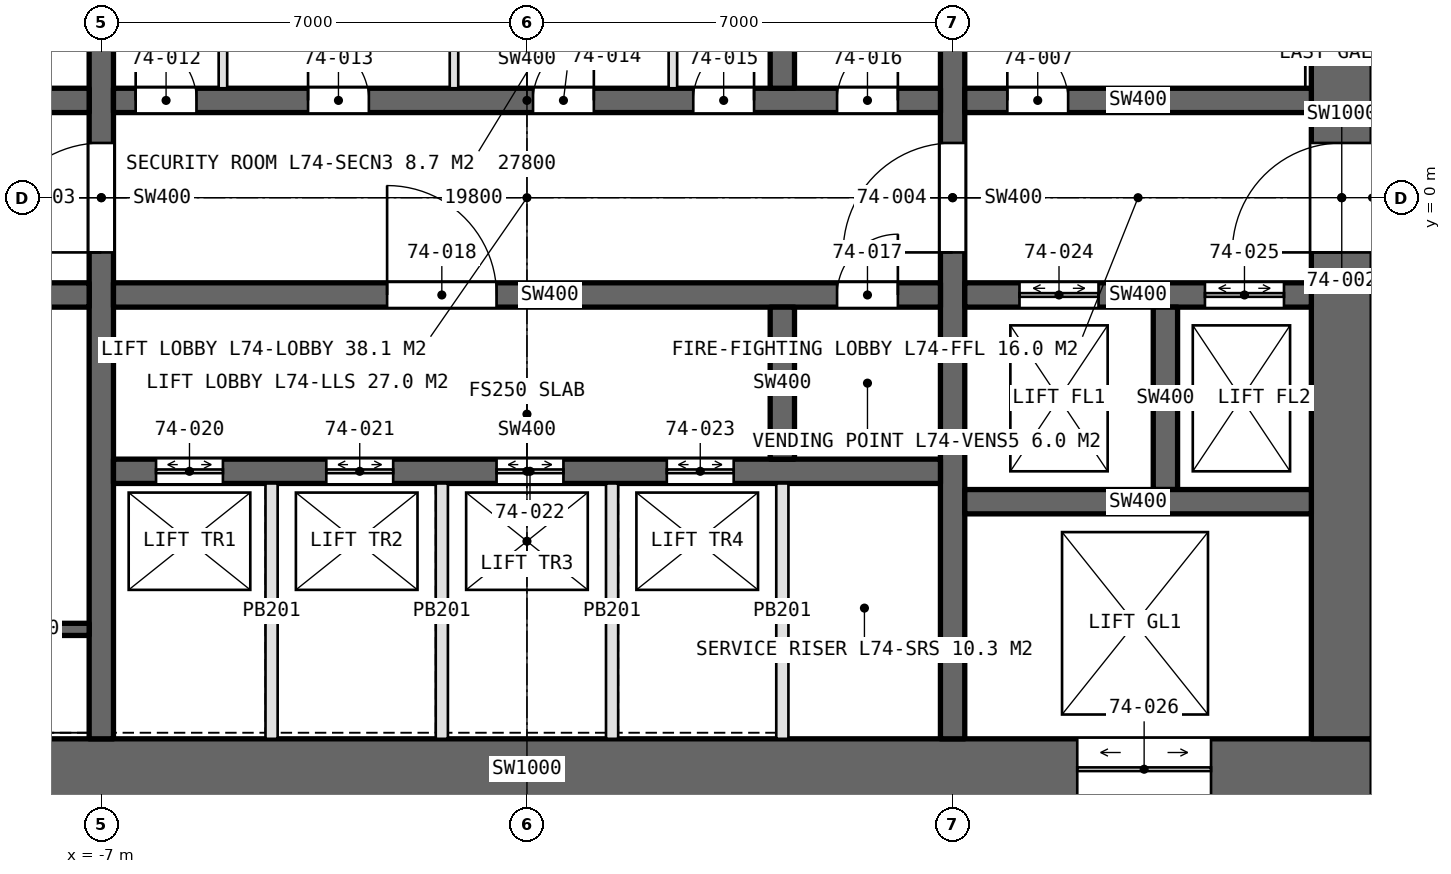
"""IFC4 building model, lengths in metres.
Left out: names, types, materials, properties, quantities, classifications, styles, units other than length and angle.
Written with IfcOpenShell. Run it as: python <this file> out.ifc"""

import sys

from ifc_helpers import new_model, si_unit, direction, frame, frame_2d, origin, place, context, subcontext, project, spatial, rectangle, extrude, element, fill, save


model = new_model("IFC4")
c1 = context("Model", 3, precision=1e-05, world=origin(), true_north=direction((0.0, 1.0)))
c2 = subcontext(c1, "Body", "Model", "MODEL_VIEW")
j1 = project(units=[si_unit("LENGTHUNIT", "METRE"), si_unit("PLANEANGLEUNIT", "RADIAN")], contexts=[c1])
p1 = place(None, origin())
s1 = spatial("IfcSite", under=j1, at=p1, CompositionType="ELEMENT")
p2 = place(p1, origin())
s2 = spatial("IfcBuilding", under=s1, at=p2, CompositionType="ELEMENT")
p3 = place(p2, frame((0.0, 0.0, 330.0)))
s3 = spatial("IfcBuildingStorey", under=s2, at=p3, CompositionType="ELEMENT", Elevation=330.0)
p4 = place(p3, frame((-13.9, -9.4, 0.0), z_axis=(0.0, 0.0, 1.0), x_axis=(1.0, 0.0, 0.0)))
e1 = element("IfcWall", 1, at=p4, inside=s3, PredefinedType="SHEAR", context=c2, shape_type="SweptSolid", body=[
    extrude(rectangle(XDim=27.8, YDim=1.0, at=frame_2d((13.9, 0.0))), origin(), (0.0, 0.0, 1.0), 4.2),
])
p5 = place(p4, frame((22.95, 0.0, 0.0)))
e2 = element("IfcOpeningElement", 2, at=p5, cuts=e1, PredefinedType="OPENING", context=c2, shape_type="SweptSolid", body=[
    extrude(rectangle(XDim=2.2, YDim=2.7, at=frame_2d((1.1, 1.35))), frame((0.0, 0.51, 0.0), z_axis=(0.0, -1.0, 0.0), x_axis=(1.0, 0.0, 0.0)), (0.0, 0.0, 1.0), 1.02),
])
p6 = place(p3, frame((13.4, -8.9, 0.0), z_axis=(0.0, 0.0, 1.0), x_axis=(0.0, 1.0, 0.0)))
e3 = element("IfcWall", 3, at=p6, inside=s3, PredefinedType="SHEAR", context=c2, shape_type="SweptSolid", body=[
    extrude(rectangle(XDim=17.8, YDim=1.0, at=frame_2d((8.9, 0.0))), origin(), (0.0, 0.0, 1.0), 4.2),
])
p7 = place(p6, frame((8.0, 0.0, 0.0)))
e4 = element("IfcOpeningElement", 4, at=p7, cuts=e3, PredefinedType="OPENING", context=c2, shape_type="SweptSolid", body=[
    extrude(rectangle(XDim=1.8, YDim=2.4, at=frame_2d((0.9, 1.2))), frame((0.0, 0.51, 0.0), z_axis=(0.0, -1.0, 0.0), x_axis=(1.0, 0.0, 0.0)), (0.0, 0.0, 1.0), 1.02),
])
p8 = place(p3, frame((-7.0, -8.9, 0.0), z_axis=(0.0, 0.0, 1.0), x_axis=(0.0, 1.0, 0.0)))
e5 = element("IfcWall", 5, at=p8, inside=s3, PredefinedType="SHEAR", context=c2, shape_type="SweptSolid", body=[
    extrude(rectangle(XDim=17.8, YDim=0.4, at=frame_2d((8.9, 0.0))), origin(), (0.0, 0.0, 1.0), 4.2),
])
p9 = place(p8, frame((8.0, 0.0, 0.0)))
e6 = element("IfcOpeningElement", 6, at=p9, cuts=e5, PredefinedType="OPENING", context=c2, shape_type="SweptSolid", body=[
    extrude(rectangle(XDim=1.8, YDim=2.4, at=frame_2d((0.9, 1.2))), frame((0.0, 0.21, 0.0), z_axis=(0.0, -1.0, 0.0), x_axis=(1.0, 0.0, 0.0)), (0.0, 0.0, 1.0), 0.42),
])
p10 = place(p3, frame((7.0, -8.9, 0.0), z_axis=(0.0, 0.0, 1.0), x_axis=(0.0, 1.0, 0.0)))
e7 = element("IfcWall", 7, at=p10, inside=s3, PredefinedType="SHEAR", context=c2, shape_type="SweptSolid", body=[
    extrude(rectangle(XDim=17.8, YDim=0.4, at=frame_2d((8.9, 0.0))), origin(), (0.0, 0.0, 1.0), 4.2),
])
p11 = place(p10, frame((8.0, 0.0, 0.0)))
e8 = element("IfcOpeningElement", 8, at=p11, cuts=e7, PredefinedType="OPENING", context=c2, shape_type="SweptSolid", body=[
    extrude(rectangle(XDim=1.8, YDim=2.4, at=frame_2d((0.9, 1.2))), frame((0.0, 0.21, 0.0), z_axis=(0.0, -1.0, 0.0), x_axis=(1.0, 0.0, 0.0)), (0.0, 0.0, 1.0), 0.42),
])
p12 = place(p3, frame((-6.8, 1.6, 0.0), z_axis=(0.0, 0.0, 1.0), x_axis=(1.0, 0.0, 0.0)))
e9 = element("IfcWall", 9, at=p12, inside=s3, PredefinedType="SHEAR", context=c2, shape_type="SweptSolid", body=[
    extrude(rectangle(XDim=13.6, YDim=0.4, at=frame_2d((6.8, 0.0))), origin(), (0.0, 0.0, 1.0), 4.2),
])
p13 = place(p12, frame((0.365, 0.0, 0.0)))
e10 = element("IfcOpeningElement", 10, at=p13, cuts=e9, PredefinedType="OPENING", context=c2, shape_type="SweptSolid", body=[
    extrude(rectangle(XDim=1.0, YDim=2.4, at=frame_2d((0.5, 1.2))), frame((0.0, 0.21, 0.0), z_axis=(0.0, -1.0, 0.0), x_axis=(1.0, 0.0, 0.0)), (0.0, 0.0, 1.0), 0.42),
])
p14 = place(p12, frame((3.2, 0.0, 0.0)))
e11 = element("IfcOpeningElement", 11, at=p14, cuts=e9, PredefinedType="OPENING", context=c2, shape_type="SweptSolid", body=[
    extrude(rectangle(XDim=1.0, YDim=2.4, at=frame_2d((0.5, 1.2))), frame((0.0, 0.21, 0.0), z_axis=(0.0, -1.0, 0.0), x_axis=(1.0, 0.0, 0.0)), (0.0, 0.0, 1.0), 0.42),
])
p15 = place(p12, frame((6.9, 0.0, 0.0)))
e12 = element("IfcOpeningElement", 12, at=p15, cuts=e9, PredefinedType="OPENING", context=c2, shape_type="SweptSolid", body=[
    extrude(rectangle(XDim=1.0, YDim=2.4, at=frame_2d((0.5, 1.2))), frame((0.0, 0.21, 0.0), z_axis=(0.0, -1.0, 0.0), x_axis=(1.0, 0.0, 0.0)), (0.0, 0.0, 1.0), 0.42),
])
p16 = place(p12, frame((9.535, 0.0, 0.0)))
e13 = element("IfcOpeningElement", 13, at=p16, cuts=e9, PredefinedType="OPENING", context=c2, shape_type="SweptSolid", body=[
    extrude(rectangle(XDim=1.0, YDim=2.4, at=frame_2d((0.5, 1.2))), frame((0.0, 0.21, 0.0), z_axis=(0.0, -1.0, 0.0), x_axis=(1.0, 0.0, 0.0)), (0.0, 0.0, 1.0), 0.42),
])
p17 = place(p12, frame((11.9, 0.0, 0.0)))
e14 = element("IfcOpeningElement", 14, at=p17, cuts=e9, PredefinedType="OPENING", context=c2, shape_type="SweptSolid", body=[
    extrude(rectangle(XDim=1.0, YDim=2.4, at=frame_2d((0.5, 1.2))), frame((0.0, 0.21, 0.0), z_axis=(0.0, -1.0, 0.0), x_axis=(1.0, 0.0, 0.0)), (0.0, 0.0, 1.0), 0.42),
])
p18 = place(p3, frame((-6.8, -1.6, 0.0), z_axis=(0.0, 0.0, 1.0), x_axis=(1.0, 0.0, 0.0)))
e15 = element("IfcWall", 15, at=p18, inside=s3, PredefinedType="SHEAR", context=c2, shape_type="SweptSolid", body=[
    extrude(rectangle(XDim=13.6, YDim=0.4, at=frame_2d((6.8, 0.0))), origin(), (0.0, 0.0, 1.0), 4.2),
])
p19 = place(p18, frame((11.9, 0.0, 0.0)))
e16 = element("IfcOpeningElement", 16, at=p19, cuts=e15, PredefinedType="OPENING", context=c2, shape_type="SweptSolid", body=[
    extrude(rectangle(XDim=1.0, YDim=2.4, at=frame_2d((0.5, 1.2))), frame((0.0, 0.21, 0.0), z_axis=(0.0, -1.0, 0.0), x_axis=(1.0, 0.0, 0.0)), (0.0, 0.0, 1.0), 0.42),
])
p20 = place(p18, frame((4.5, 0.0, 0.0)))
e17 = element("IfcOpeningElement", 17, at=p20, cuts=e15, PredefinedType="OPENING", context=c2, shape_type="SweptSolid", body=[
    extrude(rectangle(XDim=1.8, YDim=2.4, at=frame_2d((0.9, 1.2))), frame((0.0, 0.21, 0.0), z_axis=(0.0, -1.0, 0.0), x_axis=(1.0, 0.0, 0.0)), (0.0, 0.0, 1.0), 0.42),
])
p21 = place(p3, frame((-6.8, -4.5, 0.0), z_axis=(0.0, 0.0, 1.0), x_axis=(1.0, 0.0, 0.0)))
e18 = element("IfcWall", 18, at=p21, inside=s3, PredefinedType="SHEAR", context=c2, shape_type="SweptSolid", body=[
    extrude(rectangle(XDim=13.6, YDim=0.4, at=frame_2d((6.8, 0.0))), origin(), (0.0, 0.0, 1.0), 4.2),
])
p22 = place(p21, frame((0.7, 0.0, 0.0)))
e19 = element("IfcOpeningElement", 19, at=p22, cuts=e18, PredefinedType="OPENING", context=c2, shape_type="SweptSolid", body=[
    extrude(rectangle(XDim=1.1, YDim=2.4, at=frame_2d((0.55, 1.2))), frame((0.0, 0.21, 0.0), z_axis=(0.0, -1.0, 0.0), x_axis=(1.0, 0.0, 0.0)), (0.0, 0.0, 1.0), 0.42),
])
p23 = place(p21, frame((3.5, 0.0, 0.0)))
e20 = element("IfcOpeningElement", 20, at=p23, cuts=e18, PredefinedType="OPENING", context=c2, shape_type="SweptSolid", body=[
    extrude(rectangle(XDim=1.1, YDim=2.4, at=frame_2d((0.55, 1.2))), frame((0.0, 0.21, 0.0), z_axis=(0.0, -1.0, 0.0), x_axis=(1.0, 0.0, 0.0)), (0.0, 0.0, 1.0), 0.42),
])
p24 = place(p21, frame((6.3, 0.0, 0.0)))
e21 = element("IfcOpeningElement", 21, at=p24, cuts=e18, PredefinedType="OPENING", context=c2, shape_type="SweptSolid", body=[
    extrude(rectangle(XDim=1.1, YDim=2.4, at=frame_2d((0.55, 1.2))), frame((0.0, 0.21, 0.0), z_axis=(0.0, -1.0, 0.0), x_axis=(1.0, 0.0, 0.0)), (0.0, 0.0, 1.0), 0.42),
])
p25 = place(p21, frame((9.1, 0.0, 0.0)))
e22 = element("IfcOpeningElement", 22, at=p25, cuts=e18, PredefinedType="OPENING", context=c2, shape_type="SweptSolid", body=[
    extrude(rectangle(XDim=1.1, YDim=2.4, at=frame_2d((0.55, 1.2))), frame((0.0, 0.21, 0.0), z_axis=(0.0, -1.0, 0.0), x_axis=(1.0, 0.0, 0.0)), (0.0, 0.0, 1.0), 0.42),
])
for number, where, z_axis, x_axis in (
    (23, (-12.9, 1.6, 0.0), (0.0, 0.0, 1.0), (1.0, 0.0, 0.0)),
    (24, (-12.9, -1.6, 0.0), (0.0, 0.0, 1.0), (1.0, 0.0, 0.0)),
):
    element("IfcWall", number, at=place(p3, frame(where, z_axis=z_axis, x_axis=x_axis)), inside=s3, PredefinedType="SHEAR", context=c2, shape_type="SweptSolid", body=[
        extrude(rectangle(XDim=5.7, YDim=0.4, at=frame_2d((2.85, 0.0))), origin(), (0.0, 0.0, 1.0), 4.2),
    ])
p26 = place(p3, frame((7.2, 1.6, 0.0), z_axis=(0.0, 0.0, 1.0), x_axis=(1.0, 0.0, 0.0)))
e25 = element("IfcWall", 25, at=p26, inside=s3, PredefinedType="SHEAR", context=c2, shape_type="SweptSolid", body=[
    extrude(rectangle(XDim=5.7, YDim=0.4, at=frame_2d((2.85, 0.0))), origin(), (0.0, 0.0, 1.0), 4.2),
])
p27 = place(p26, frame((0.7, 0.0, 0.0)))
e26 = element("IfcOpeningElement", 26, at=p27, cuts=e25, PredefinedType="OPENING", context=c2, shape_type="SweptSolid", body=[
    extrude(rectangle(XDim=1.0, YDim=2.4, at=frame_2d((0.5, 1.2))), frame((0.0, 0.21, 0.0), z_axis=(0.0, -1.0, 0.0), x_axis=(1.0, 0.0, 0.0)), (0.0, 0.0, 1.0), 0.42),
])
p28 = place(p3, frame((7.2, -1.6, 0.0), z_axis=(0.0, 0.0, 1.0), x_axis=(1.0, 0.0, 0.0)))
e27 = element("IfcWall", 27, at=p28, inside=s3, PredefinedType="SHEAR", context=c2, shape_type="SweptSolid", body=[
    extrude(rectangle(XDim=5.7, YDim=0.4, at=frame_2d((2.85, 0.0))), origin(), (0.0, 0.0, 1.0), 4.2),
])
p29 = place(p28, frame((0.9, 0.0, 0.0)))
e28 = element("IfcOpeningElement", 28, at=p29, cuts=e27, PredefinedType="OPENING", context=c2, shape_type="SweptSolid", body=[
    extrude(rectangle(XDim=1.3, YDim=2.4, at=frame_2d((0.65, 1.2))), frame((0.0, 0.21, 0.0), z_axis=(0.0, -1.0, 0.0), x_axis=(1.0, 0.0, 0.0)), (0.0, 0.0, 1.0), 0.42),
])
p30 = place(p28, frame((3.95, 0.0, 0.0)))
e29 = element("IfcOpeningElement", 29, at=p30, cuts=e27, PredefinedType="OPENING", context=c2, shape_type="SweptSolid", body=[
    extrude(rectangle(XDim=1.3, YDim=2.4, at=frame_2d((0.65, 1.2))), frame((0.0, 0.21, 0.0), z_axis=(0.0, -1.0, 0.0), x_axis=(1.0, 0.0, 0.0)), (0.0, 0.0, 1.0), 0.42),
])
p31 = place(p3, frame((10.5, -4.8, 0.0), z_axis=(0.0, 0.0, 1.0), x_axis=(0.0, 1.0, 0.0)))
e30 = element("IfcWall", 30, at=p31, inside=s3, PredefinedType="SHEAR", context=c2, shape_type="SweptSolid", body=[
    extrude(rectangle(XDim=3.0, YDim=0.4, at=frame_2d((1.5, 0.0))), origin(), (0.0, 0.0, 1.0), 4.2),
])
p32 = place(p3, frame((7.2, -5.0, 0.0), z_axis=(0.0, 0.0, 1.0), x_axis=(1.0, 0.0, 0.0)))
e31 = element("IfcWall", 31, at=p32, inside=s3, PredefinedType="SHEAR", context=c2, shape_type="SweptSolid", body=[
    extrude(rectangle(XDim=5.7, YDim=0.4, at=frame_2d((2.85, 0.0))), origin(), (0.0, 0.0, 1.0), 4.2),
])
for number, where, z_axis, x_axis in (
    (32, (4.2, 1.8, 0.0), (0.0, 0.0, 1.0), (0.0, 1.0, 0.0)),
    (33, (4.2, -4.3, 0.0), (0.0, 0.0, 1.0), (0.0, 1.0, 0.0)),
):
    element("IfcWall", number, at=place(p3, frame(where, z_axis=z_axis, x_axis=x_axis)), inside=s3, PredefinedType="SHEAR", context=c2, shape_type="SweptSolid", body=[
        extrude(rectangle(XDim=2.5, YDim=0.4, at=frame_2d((1.25, 0.0))), origin(), (0.0, 0.0, 1.0), 4.2),
    ])
for number, where, z_axis, x_axis in (
    (34, (-5.0, 1.8, 0.0), (0.0, 0.0, 1.0), (0.0, 1.0, 0.0)),
    (35, (-1.2, 1.8, 0.0), (0.0, 0.0, 1.0), (0.0, 1.0, 0.0)),
    (36, (2.4, 1.8, 0.0), (0.0, 0.0, 1.0), (0.0, 1.0, 0.0)),
):
    element("IfcWall", number, at=place(p3, frame(where, z_axis=z_axis, x_axis=x_axis)), inside=s3, PredefinedType="PARTITIONING", context=c2, shape_type="SweptSolid", body=[
        extrude(rectangle(XDim=2.5, YDim=0.14, at=frame_2d((1.25, 0.0))), origin(), (0.0, 0.0, 1.0), 3.95),
    ])
for number, where, z_axis, x_axis in (
    (37, (-4.2, -4.7, 0.0), (0.0, 0.0, 1.0), (0.0, -1.0, 0.0)),
    (38, (-1.4, -4.7, 0.0), (0.0, 0.0, 1.0), (0.0, -1.0, 0.0)),
    (39, (1.4, -4.7, 0.0), (0.0, 0.0, 1.0), (0.0, -1.0, 0.0)),
    (40, (4.2, -4.7, 0.0), (0.0, 0.0, 1.0), (0.0, -1.0, 0.0)),
):
    element("IfcWall", number, at=place(p3, frame(where, z_axis=z_axis, x_axis=x_axis)), inside=s3, PredefinedType="PARTITIONING", context=c2, shape_type="SweptSolid", body=[
        extrude(rectangle(XDim=4.2, YDim=0.2, at=frame_2d((2.1, 0.0))), origin(), (0.0, 0.0, 1.0), 4.2),
    ])
p33 = place(p3, frame((-9.15, -7.1, 0.0), z_axis=(0.0, 0.0, 1.0), x_axis=(1.0, 0.0, 0.0)))
e41 = element("IfcWall", 41, at=p33, inside=s3, PredefinedType="SOLIDWALL", context=c2, shape_type="SweptSolid", body=[
    extrude(rectangle(XDim=1.95, YDim=0.2, at=frame_2d((0.975, 0.0))), origin(), (0.0, 0.0, 1.0), 4.2),
])
p34 = place(p7, origin())
e42 = element("IfcDoor", 42, at=p34, inside=s3, OperationType="DOUBLE_DOOR_SINGLE_SWING", PredefinedType="DOOR", context=c2, shape_type="SweptSolid", body=[
    extrude(rectangle(XDim=1.8, YDim=2.4, at=frame_2d((0.9, 1.2))), frame((0.0, 0.025, 0.0), z_axis=(0.0, -1.0, 0.0), x_axis=(1.0, 0.0, 0.0)), (0.0, 0.0, 1.0), 0.05),
])
fill(e4, e42)
p35 = place(p9, origin())
e43 = element("IfcDoor", 43, at=p35, inside=s3, OperationType="DOUBLE_DOOR_SINGLE_SWING", PredefinedType="DOOR", context=c2, shape_type="SweptSolid", body=[
    extrude(rectangle(XDim=1.8, YDim=2.4, at=frame_2d((0.9, 1.2))), frame((0.0, 0.025, 0.0), z_axis=(0.0, -1.0, 0.0), x_axis=(1.0, 0.0, 0.0)), (0.0, 0.0, 1.0), 0.05),
])
fill(e6, e43)
p36 = place(p11, origin())
e44 = element("IfcDoor", 44, at=p36, inside=s3, OperationType="DOUBLE_DOOR_SINGLE_SWING", PredefinedType="DOOR", context=c2, shape_type="SweptSolid", body=[
    extrude(rectangle(XDim=1.8, YDim=2.4, at=frame_2d((0.9, 1.2))), frame((0.0, 0.025, 0.0), z_axis=(0.0, -1.0, 0.0), x_axis=(1.0, 0.0, 0.0)), (0.0, 0.0, 1.0), 0.05),
])
fill(e8, e44)
p37 = place(p27, origin())
e45 = element("IfcDoor", 45, at=p37, inside=s3, OperationType="SINGLE_SWING_LEFT", PredefinedType="DOOR", context=c2, shape_type="SweptSolid", body=[
    extrude(rectangle(XDim=1.0, YDim=2.4, at=frame_2d((0.5, 1.2))), frame((0.0, 0.025, 0.0), z_axis=(0.0, -1.0, 0.0), x_axis=(1.0, 0.0, 0.0)), (0.0, 0.0, 1.0), 0.05),
])
fill(e26, e45)
p38 = place(p13, origin())
e46 = element("IfcDoor", 46, at=p38, inside=s3, OperationType="SINGLE_SWING_LEFT", PredefinedType="DOOR", context=c2, shape_type="SweptSolid", body=[
    extrude(rectangle(XDim=1.0, YDim=2.4, at=frame_2d((0.5, 1.2))), frame((0.0, 0.025, 0.0), z_axis=(0.0, -1.0, 0.0), x_axis=(1.0, 0.0, 0.0)), (0.0, 0.0, 1.0), 0.05),
])
fill(e10, e46)
p39 = place(p14, origin())
e47 = element("IfcDoor", 47, at=p39, inside=s3, OperationType="SINGLE_SWING_LEFT", PredefinedType="DOOR", context=c2, shape_type="SweptSolid", body=[
    extrude(rectangle(XDim=1.0, YDim=2.4, at=frame_2d((0.5, 1.2))), frame((0.0, 0.025, 0.0), z_axis=(0.0, -1.0, 0.0), x_axis=(1.0, 0.0, 0.0)), (0.0, 0.0, 1.0), 0.05),
])
fill(e11, e47)
p40 = place(p15, origin())
e48 = element("IfcDoor", 48, at=p40, inside=s3, OperationType="SINGLE_SWING_RIGHT", PredefinedType="DOOR", context=c2, shape_type="SweptSolid", body=[
    extrude(rectangle(XDim=1.0, YDim=2.4, at=frame_2d((0.5, 1.2))), frame((0.0, 0.025, 0.0), z_axis=(0.0, -1.0, 0.0), x_axis=(1.0, 0.0, 0.0)), (0.0, 0.0, 1.0), 0.05),
])
fill(e12, e48)
p41 = place(p16, origin())
e49 = element("IfcDoor", 49, at=p41, inside=s3, OperationType="SINGLE_SWING_RIGHT", PredefinedType="DOOR", context=c2, shape_type="SweptSolid", body=[
    extrude(rectangle(XDim=1.0, YDim=2.4, at=frame_2d((0.5, 1.2))), frame((0.0, 0.025, 0.0), z_axis=(0.0, -1.0, 0.0), x_axis=(1.0, 0.0, 0.0)), (0.0, 0.0, 1.0), 0.05),
])
fill(e13, e49)
p42 = place(p17, origin())
e50 = element("IfcDoor", 50, at=p42, inside=s3, OperationType="SINGLE_SWING_RIGHT", PredefinedType="DOOR", context=c2, shape_type="SweptSolid", body=[
    extrude(rectangle(XDim=1.0, YDim=2.4, at=frame_2d((0.5, 1.2))), frame((0.0, 0.025, 0.0), z_axis=(0.0, -1.0, 0.0), x_axis=(1.0, 0.0, 0.0)), (0.0, 0.0, 1.0), 0.05),
])
fill(e14, e50)
p43 = place(p19, origin())
e51 = element("IfcDoor", 51, at=p43, inside=s3, OperationType="SINGLE_SWING_RIGHT", PredefinedType="DOOR", context=c2, shape_type="SweptSolid", body=[
    extrude(rectangle(XDim=1.0, YDim=2.4, at=frame_2d((0.5, 1.2))), frame((0.0, 0.025, 0.0), z_axis=(0.0, -1.0, 0.0), x_axis=(1.0, 0.0, 0.0)), (0.0, 0.0, 1.0), 0.05),
])
fill(e16, e51)
p44 = place(p20, origin())
e52 = element("IfcDoor", 52, at=p44, inside=s3, OperationType="DOUBLE_DOOR_SINGLE_SWING", PredefinedType="DOOR", context=c2, shape_type="SweptSolid", body=[
    extrude(rectangle(XDim=1.8, YDim=2.4, at=frame_2d((0.9, 1.2))), frame((0.0, 0.025, 0.0), z_axis=(0.0, -1.0, 0.0), x_axis=(1.0, 0.0, 0.0)), (0.0, 0.0, 1.0), 0.05),
])
fill(e17, e52)
p45 = place(p22, origin())
e53 = element("IfcDoor", 53, at=p45, inside=s3, OperationType="DOUBLE_DOOR_SLIDING", PredefinedType="DOOR", context=c2, shape_type="SweptSolid", body=[
    extrude(rectangle(XDim=1.1, YDim=2.4, at=frame_2d((0.55, 1.2))), frame((0.0, 0.025, 0.0), z_axis=(0.0, -1.0, 0.0), x_axis=(1.0, 0.0, 0.0)), (0.0, 0.0, 1.0), 0.05),
])
fill(e19, e53)
p46 = place(p23, origin())
e54 = element("IfcDoor", 54, at=p46, inside=s3, OperationType="DOUBLE_DOOR_SLIDING", PredefinedType="DOOR", context=c2, shape_type="SweptSolid", body=[
    extrude(rectangle(XDim=1.1, YDim=2.4, at=frame_2d((0.55, 1.2))), frame((0.0, 0.025, 0.0), z_axis=(0.0, -1.0, 0.0), x_axis=(1.0, 0.0, 0.0)), (0.0, 0.0, 1.0), 0.05),
])
fill(e20, e54)
p47 = place(p24, origin())
e55 = element("IfcDoor", 55, at=p47, inside=s3, OperationType="DOUBLE_DOOR_SLIDING", PredefinedType="DOOR", context=c2, shape_type="SweptSolid", body=[
    extrude(rectangle(XDim=1.1, YDim=2.4, at=frame_2d((0.55, 1.2))), frame((0.0, 0.025, 0.0), z_axis=(0.0, -1.0, 0.0), x_axis=(1.0, 0.0, 0.0)), (0.0, 0.0, 1.0), 0.05),
])
fill(e21, e55)
p48 = place(p25, origin())
e56 = element("IfcDoor", 56, at=p48, inside=s3, OperationType="DOUBLE_DOOR_SLIDING", PredefinedType="DOOR", context=c2, shape_type="SweptSolid", body=[
    extrude(rectangle(XDim=1.1, YDim=2.4, at=frame_2d((0.55, 1.2))), frame((0.0, 0.025, 0.0), z_axis=(0.0, -1.0, 0.0), x_axis=(1.0, 0.0, 0.0)), (0.0, 0.0, 1.0), 0.05),
])
fill(e22, e56)
p49 = place(p29, origin())
e57 = element("IfcDoor", 57, at=p49, inside=s3, OperationType="DOUBLE_DOOR_SLIDING", PredefinedType="DOOR", context=c2, shape_type="SweptSolid", body=[
    extrude(rectangle(XDim=1.3, YDim=2.4, at=frame_2d((0.65, 1.2))), frame((0.0, 0.025, 0.0), z_axis=(0.0, -1.0, 0.0), x_axis=(1.0, 0.0, 0.0)), (0.0, 0.0, 1.0), 0.05),
])
fill(e28, e57)
p50 = place(p30, origin())
e58 = element("IfcDoor", 58, at=p50, inside=s3, OperationType="DOUBLE_DOOR_SLIDING", PredefinedType="DOOR", context=c2, shape_type="SweptSolid", body=[
    extrude(rectangle(XDim=1.3, YDim=2.4, at=frame_2d((0.65, 1.2))), frame((0.0, 0.025, 0.0), z_axis=(0.0, -1.0, 0.0), x_axis=(1.0, 0.0, 0.0)), (0.0, 0.0, 1.0), 0.05),
])
fill(e29, e58)
p51 = place(p5, origin())
e59 = element("IfcDoor", 59, at=p51, inside=s3, OperationType="DOUBLE_DOOR_SLIDING", PredefinedType="DOOR", context=c2, shape_type="SweptSolid", body=[
    extrude(rectangle(XDim=2.2, YDim=2.7, at=frame_2d((1.1, 1.35))), frame((0.0, 0.025, 0.0), z_axis=(0.0, -1.0, 0.0), x_axis=(1.0, 0.0, 0.0)), (0.0, 0.0, 1.0), 0.05),
])
fill(e2, e59)
save(model, sys.argv[1])
